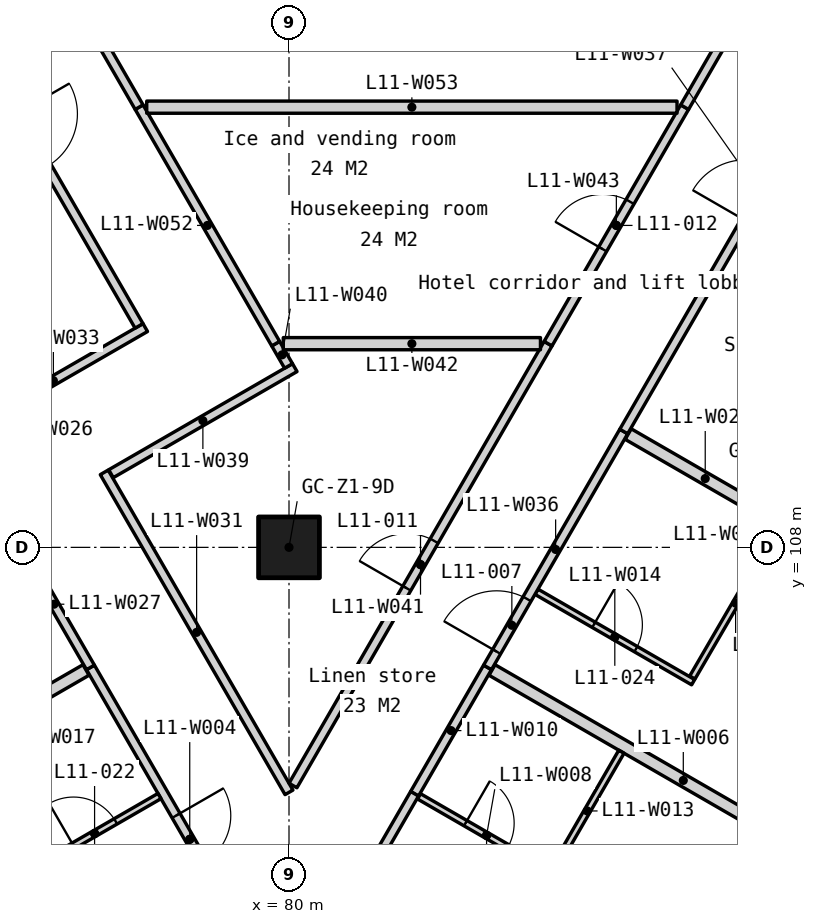
"""IFC4 building model, lengths in metres.
Left out: names, types, materials, properties, quantities, classifications, styles, units other than length and angle.
Written with IfcOpenShell. Run it as: python <this file> out.ifc"""

import sys

from ifc_helpers import new_model, si_unit, direction, frame, frame_2d, origin, origin_2d, place, context, subcontext, project, spatial, polyline, rectangle, outline, extrude, element, fill, save


model = new_model("IFC4")
c1 = context("Model", 3, precision=1e-05, world=origin(), true_north=direction((0.0, 1.0)))
c2 = subcontext(c1, "Body", "Model", "MODEL_VIEW")
j1 = project(units=[si_unit("LENGTHUNIT", "METRE"), si_unit("PLANEANGLEUNIT", "RADIAN")], contexts=[c1])
p1 = place(None, origin())
s1 = spatial("IfcSite", under=j1, at=p1, CompositionType="ELEMENT")
p2 = place(p1, origin())
s2 = spatial("IfcBuilding", under=s1, at=p2, CompositionType="ELEMENT")
p3 = place(p2, frame((0.0, 0.0, 52.5)))
s3 = spatial("IfcBuildingStorey", under=s2, at=p3, CompositionType="ELEMENT", Elevation=52.5)
p4 = place(p3, frame((80.0, 108.0, 0.0), z_axis=(0.0, 0.0, 1.0), x_axis=(1.0, 0.0, 0.0)))
e1 = element("IfcColumn", 1, at=p4, inside=s3, PredefinedType="COLUMN", context=c2, shape_type="SweptSolid", body=[
    extrude(rectangle(XDim=1.0, YDim=1.0, at=origin_2d()), origin(), (0.0, 0.0, 1.0), 3.5),
])
p5 = place(p3, frame((64.305, 112.405, -0.15), z_axis=(0.0, 0.0, 1.0), x_axis=(0.499997464327, -0.866026867751, 0.0)))
e2 = element("IfcWall", 2, at=p5, inside=s3, PredefinedType="SOLIDWALL", context=c2, shape_type="SweptSolid", body=[
    extrude(outline(polyline([(25.18, 3.5), (25.18, 0.0), (0.0, 0.0), (0.0, 3.5), (25.18, 3.5)])), frame((0.0, 0.225, 0.0), z_axis=(0.0, -1.0, 0.0), x_axis=(1.0, 0.0, 0.0)), (0.0, 0.0, 1.0), 0.45),
])
p6 = place(p5, frame((5.81, 0.0, 1.05)))
e3 = element("IfcOpeningElement", 3, at=p6, cuts=e2, PredefinedType="OPENING", context=c2, shape_type="SweptSolid", body=[
    extrude(rectangle(XDim=1.2, YDim=1.5, at=frame_2d((0.6, 0.75))), frame((0.0, 0.235, 0.0), z_axis=(0.0, -1.0, 0.0), x_axis=(1.0, 0.0, 0.0)), (0.0, 0.0, 1.0), 0.47),
])
p7 = place(p5, frame((7.51, 0.0, 1.05)))
e4 = element("IfcOpeningElement", 4, at=p7, cuts=e2, PredefinedType="OPENING", context=c2, shape_type="SweptSolid", body=[
    extrude(rectangle(XDim=1.2, YDim=1.5, at=frame_2d((0.6, 0.75))), frame((0.0, 0.235, 0.0), z_axis=(0.0, -1.0, 0.0), x_axis=(1.0, 0.0, 0.0)), (0.0, 0.0, 1.0), 0.47),
])
p8 = place(p5, frame((14.77, 0.0, 1.05)))
e5 = element("IfcOpeningElement", 5, at=p8, cuts=e2, PredefinedType="OPENING", context=c2, shape_type="SweptSolid", body=[
    extrude(rectangle(XDim=1.2, YDim=1.5, at=frame_2d((0.6, 0.75))), frame((0.0, 0.235, 0.0), z_axis=(0.0, -1.0, 0.0), x_axis=(1.0, 0.0, 0.0)), (0.0, 0.0, 1.0), 0.47),
])
p9 = place(p5, frame((16.47, 0.0, 1.05)))
e6 = element("IfcOpeningElement", 6, at=p9, cuts=e2, PredefinedType="OPENING", context=c2, shape_type="SweptSolid", body=[
    extrude(rectangle(XDim=1.2, YDim=1.5, at=frame_2d((0.6, 0.75))), frame((0.0, 0.235, 0.0), z_axis=(0.0, -1.0, 0.0), x_axis=(1.0, 0.0, 0.0)), (0.0, 0.0, 1.0), 0.47),
])
p10 = place(p5, frame((23.258, 0.0, 1.05)))
e7 = element("IfcOpeningElement", 7, at=p10, cuts=e2, PredefinedType="OPENING", context=c2, shape_type="SweptSolid", body=[
    extrude(rectangle(XDim=1.2, YDim=1.5, at=frame_2d((0.6, 0.75))), frame((0.0, 0.235, 0.0), z_axis=(0.0, -1.0, 0.0), x_axis=(1.0, 0.0, 0.0)), (0.0, 0.0, 1.0), 0.47),
])
p11 = place(p3, frame((83.105, 90.599, -0.15), z_axis=(0.0, 0.0, 1.0), x_axis=(0.499999201451, 0.866025864826, 0.0)))
e8 = element("IfcWall", 8, at=p11, inside=s3, PredefinedType="SOLIDWALL", context=c2, shape_type="SweptSolid", body=[
    extrude(outline(polyline([(44.8, 0.0), (44.8, 3.5), (0.0, 3.5), (0.0, 0.0), (44.8, 0.0)])), frame((0.0, 0.225, 0.0), z_axis=(0.0, -1.0, 0.0), x_axis=(1.0, 0.0, 0.0)), (0.0, 0.0, 1.0), 0.45),
])
p12 = place(p11, frame((0.722, 0.0, 1.05)))
e9 = element("IfcOpeningElement", 9, at=p12, cuts=e8, PredefinedType="OPENING", context=c2, shape_type="SweptSolid", body=[
    extrude(rectangle(XDim=1.2, YDim=1.5, at=frame_2d((0.6, 0.75))), frame((0.0, 0.235, 0.0), z_axis=(0.0, -1.0, 0.0), x_axis=(1.0, 0.0, 0.0)), (0.0, 0.0, 1.0), 0.47),
])
p13 = place(p11, frame((7.51, 0.0, 1.05)))
e10 = element("IfcOpeningElement", 10, at=p13, cuts=e8, PredefinedType="OPENING", context=c2, shape_type="SweptSolid", body=[
    extrude(rectangle(XDim=1.2, YDim=1.5, at=frame_2d((0.6, 0.75))), frame((0.0, 0.235, 0.0), z_axis=(0.0, -1.0, 0.0), x_axis=(1.0, 0.0, 0.0)), (0.0, 0.0, 1.0), 0.47),
])
p14 = place(p11, frame((9.21, 0.0, 1.05)))
e11 = element("IfcOpeningElement", 11, at=p14, cuts=e8, PredefinedType="OPENING", context=c2, shape_type="SweptSolid", body=[
    extrude(rectangle(XDim=1.2, YDim=1.5, at=frame_2d((0.6, 0.75))), frame((0.0, 0.235, 0.0), z_axis=(0.0, -1.0, 0.0), x_axis=(1.0, 0.0, 0.0)), (0.0, 0.0, 1.0), 0.47),
])
p15 = place(p11, frame((16.47, 0.0, 1.05)))
e12 = element("IfcOpeningElement", 12, at=p15, cuts=e8, PredefinedType="OPENING", context=c2, shape_type="SweptSolid", body=[
    extrude(rectangle(XDim=1.2, YDim=1.5, at=frame_2d((0.6, 0.75))), frame((0.0, 0.235, 0.0), z_axis=(0.0, -1.0, 0.0), x_axis=(1.0, 0.0, 0.0)), (0.0, 0.0, 1.0), 0.47),
])
p16 = place(p11, frame((18.17, 0.0, 1.05)))
e13 = element("IfcOpeningElement", 13, at=p16, cuts=e8, PredefinedType="OPENING", context=c2, shape_type="SweptSolid", body=[
    extrude(rectangle(XDim=1.2, YDim=1.5, at=frame_2d((0.6, 0.75))), frame((0.0, 0.235, 0.0), z_axis=(0.0, -1.0, 0.0), x_axis=(1.0, 0.0, 0.0)), (0.0, 0.0, 1.0), 0.47),
])
p17 = place(p11, frame((25.43, 0.0, 1.05)))
e14 = element("IfcOpeningElement", 14, at=p17, cuts=e8, PredefinedType="OPENING", context=c2, shape_type="SweptSolid", body=[
    extrude(rectangle(XDim=1.2, YDim=1.5, at=frame_2d((0.6, 0.75))), frame((0.0, 0.235, 0.0), z_axis=(0.0, -1.0, 0.0), x_axis=(1.0, 0.0, 0.0)), (0.0, 0.0, 1.0), 0.47),
])
p18 = place(p11, frame((27.13, 0.0, 1.05)))
e15 = element("IfcOpeningElement", 15, at=p18, cuts=e8, PredefinedType="OPENING", context=c2, shape_type="SweptSolid", body=[
    extrude(rectangle(XDim=1.2, YDim=1.5, at=frame_2d((0.6, 0.75))), frame((0.0, 0.235, 0.0), z_axis=(0.0, -1.0, 0.0), x_axis=(1.0, 0.0, 0.0)), (0.0, 0.0, 1.0), 0.47),
])
p19 = place(p11, frame((34.39, 0.0, 1.05)))
e16 = element("IfcOpeningElement", 16, at=p19, cuts=e8, PredefinedType="OPENING", context=c2, shape_type="SweptSolid", body=[
    extrude(rectangle(XDim=1.2, YDim=1.5, at=frame_2d((0.6, 0.75))), frame((0.0, 0.235, 0.0), z_axis=(0.0, -1.0, 0.0), x_axis=(1.0, 0.0, 0.0)), (0.0, 0.0, 1.0), 0.47),
])
p20 = place(p11, frame((36.09, 0.0, 1.05)))
e17 = element("IfcOpeningElement", 17, at=p20, cuts=e8, PredefinedType="OPENING", context=c2, shape_type="SweptSolid", body=[
    extrude(rectangle(XDim=1.2, YDim=1.5, at=frame_2d((0.6, 0.75))), frame((0.0, 0.235, 0.0), z_axis=(0.0, -1.0, 0.0), x_axis=(1.0, 0.0, 0.0)), (0.0, 0.0, 1.0), 0.47),
])
p21 = place(p11, frame((42.878, 0.0, 1.05)))
e18 = element("IfcOpeningElement", 18, at=p21, cuts=e8, PredefinedType="OPENING", context=c2, shape_type="SweptSolid", body=[
    extrude(rectangle(XDim=1.2, YDim=1.5, at=frame_2d((0.6, 0.75))), frame((0.0, 0.235, 0.0), z_axis=(0.0, -1.0, 0.0), x_axis=(1.0, 0.0, 0.0)), (0.0, 0.0, 1.0), 0.47),
])
p22 = place(p3, frame((76.735, 106.026, 0.0), z_axis=(0.0, 0.0, 1.0), x_axis=(0.499995393218, -0.866028063495, 0.0)))
e19 = element("IfcWall", 19, at=p22, inside=s3, PredefinedType="PARTITIONING", context=c2, shape_type="SweptSolid", body=[
    extrude(rectangle(XDim=6.53, YDim=0.15, at=frame_2d((3.265, 0.0))), origin(), (0.0, 0.0, 1.0), 3.35),
])
p23 = place(p22, frame((2.815, 0.0, 0.0)))
e20 = element("IfcOpeningElement", 20, at=p23, cuts=e19, PredefinedType="OPENING", context=c2, shape_type="SweptSolid", body=[
    extrude(rectangle(XDim=0.9, YDim=2.1, at=frame_2d((0.45, 1.05))), frame((0.0, 0.085, 0.0), z_axis=(0.0, -1.0, 0.0), x_axis=(1.0, 0.0, 0.0)), (0.0, 0.0, 1.0), 0.17),
])
p24 = place(p3, frame((83.339, 105.983, 0.0), z_axis=(0.0, 0.0, 1.0), x_axis=(0.866023858256, -0.500002676924, 0.0)))
e21 = element("IfcWall", 21, at=p24, inside=s3, PredefinedType="PARTITIONING", context=c2, shape_type="SweptSolid", body=[
    extrude(rectangle(XDim=7.265, YDim=0.2, at=frame_2d((3.633, 0.0))), origin(), (0.0, 0.0, 1.0), 3.35),
])
p25 = place(p3, frame((82.139, 103.905, 0.0), z_axis=(0.0, 0.0, 1.0), x_axis=(0.866014388206, -0.500019079056, 0.0)))
e22 = element("IfcWall", 22, at=p25, inside=s3, PredefinedType="PARTITIONING", context=c2, shape_type="SweptSolid", body=[
    extrude(rectangle(XDim=2.565, YDim=0.1, at=frame_2d((1.282, 0.0))), origin(), (0.0, 0.0, 1.0), 3.35),
])
p26 = place(p25, frame((0.883, 0.0, 0.0)))
e23 = element("IfcOpeningElement", 23, at=p26, cuts=e22, PredefinedType="OPENING", context=c2, shape_type="SweptSolid", body=[
    extrude(rectangle(XDim=0.8, YDim=2.1, at=frame_2d((0.4, 1.05))), frame((0.0, 0.06, 0.0), z_axis=(0.0, -1.0, 0.0), x_axis=(1.0, 0.0, 0.0)), (0.0, 0.0, 1.0), 0.12),
])
p27 = place(p3, frame((75.735, 102.677, 0.0), z_axis=(0.0, 0.0, 1.0), x_axis=(0.866040446274, 0.499973944738, 0.0)))
e24 = element("IfcWall", 24, at=p27, inside=s3, PredefinedType="PARTITIONING", context=c2, shape_type="SweptSolid", body=[
    extrude(rectangle(XDim=2.465, YDim=0.1, at=frame_2d((1.232, 0.0))), origin(), (0.0, 0.0, 1.0), 3.35),
])
p28 = place(p27, frame((0.833, 0.0, 0.0)))
e25 = element("IfcOpeningElement", 25, at=p28, cuts=e24, PredefinedType="OPENING", context=c2, shape_type="SweptSolid", body=[
    extrude(rectangle(XDim=0.8, YDim=2.1, at=frame_2d((0.4, 1.05))), frame((0.0, 0.06, 0.0), z_axis=(0.0, -1.0, 0.0), x_axis=(1.0, 0.0, 0.0)), (0.0, 0.0, 1.0), 0.12),
])
p29 = place(p3, frame((82.065, 103.947, 0.0), z_axis=(0.0, 0.0, 1.0), x_axis=(0.500001309137, 0.866024647952, 0.0)))
e26 = element("IfcWall", 26, at=p29, inside=s3, PredefinedType="PARTITIONING", context=c2, shape_type="SweptSolid", body=[
    extrude(rectangle(XDim=2.4, YDim=0.15, at=frame_2d((1.2, 0.0))), origin(), (0.0, 0.0, 1.0), 3.35),
])
p30 = place(p3, frame((80.06, 100.474, 0.0), z_axis=(0.0, 0.0, 1.0), x_axis=(0.499963124258, 0.866046692957, 0.0)))
e27 = element("IfcWall", 27, at=p30, inside=s3, PredefinedType="PARTITIONING", context=c2, shape_type="SweptSolid", body=[
    extrude(rectangle(XDim=4.01, YDim=0.15, at=frame_2d((2.005, 0.0))), origin(), (0.0, 0.0, 1.0), 3.35),
])
p31 = place(p30, frame((1.555, 0.0, 0.0)))
e28 = element("IfcOpeningElement", 28, at=p31, cuts=e27, PredefinedType="OPENING", context=c2, shape_type="SweptSolid", body=[
    extrude(rectangle(XDim=0.9, YDim=2.1, at=frame_2d((0.45, 1.05))), frame((0.0, 0.085, 0.0), z_axis=(0.0, -1.0, 0.0), x_axis=(1.0, 0.0, 0.0)), (0.0, 0.0, 1.0), 0.17),
])
p32 = place(p3, frame((84.342, 102.69, 0.0), z_axis=(0.0, 0.0, 1.0), x_axis=(0.499966648284, 0.866044658551, 0.0)))
e29 = element("IfcWall", 29, at=p32, inside=s3, PredefinedType="PARTITIONING", context=c2, shape_type="SweptSolid", body=[
    extrude(rectangle(XDim=2.25, YDim=0.1, at=frame_2d((1.125, 0.0))), origin(), (0.0, 0.0, 1.0), 3.35),
])
p33 = place(p3, frame((84.07, 107.27, 0.0), z_axis=(0.0, 0.0, 1.0), x_axis=(0.866053027861, -0.499952150643, 0.0)))
e30 = element("IfcWall", 30, at=p33, inside=s3, PredefinedType="PARTITIONING", context=c2, shape_type="SweptSolid", body=[
    extrude(rectangle(XDim=2.975, YDim=0.1, at=frame_2d((1.487, 0.0))), origin(), (0.0, 0.0, 1.0), 3.35),
])
p34 = place(p33, frame((1.087, 0.0, 0.0)))
e31 = element("IfcOpeningElement", 31, at=p34, cuts=e30, PredefinedType="OPENING", context=c2, shape_type="SweptSolid", body=[
    extrude(rectangle(XDim=0.8, YDim=2.1, at=frame_2d((0.4, 1.05))), frame((0.0, 0.06, 0.0), z_axis=(0.0, -1.0, 0.0), x_axis=(1.0, 0.0, 0.0)), (0.0, 0.0, 1.0), 0.12),
])
p35 = place(p3, frame((74.483, 104.726, 0.0), z_axis=(0.0, 0.0, 1.0), x_axis=(0.866006140796, 0.500033362991, 0.0)))
e32 = element("IfcWall", 32, at=p35, inside=s3, PredefinedType="PARTITIONING", context=c2, shape_type="SweptSolid", body=[
    extrude(rectangle(XDim=2.515, YDim=0.2, at=frame_2d((1.257, 0.0))), origin(), (0.0, 0.0, 1.0), 3.35),
])
p36 = place(p3, frame((75.535, 108.104, 0.0), z_axis=(0.0, 0.0, 1.0), x_axis=(0.500033551112, -0.866006032174, 0.0)))
e33 = element("IfcWall", 33, at=p36, inside=s3, PredefinedType="PARTITIONING", context=c2, shape_type="SweptSolid", body=[
    extrude(rectangle(XDim=2.4, YDim=0.15, at=frame_2d((1.2, 0.0))), origin(), (0.0, 0.0, 1.0), 3.35),
])
p37 = place(p3, frame((85.579, 109.863, 0.0), z_axis=(0.0, 0.0, 1.0), x_axis=(0.86601045545, -0.500025890382, 0.0)))
e34 = element("IfcWall", 34, at=p37, inside=s3, PredefinedType="PARTITIONING", context=c2, shape_type="SweptSolid", body=[
    extrude(rectangle(XDim=2.925, YDim=0.2, at=frame_2d((1.462, 0.0))), origin(), (0.0, 0.0, 1.0), 3.35),
])
p38 = place(p3, frame((86.633, 105.859, 0.0), z_axis=(0.0, 0.0, 1.0), x_axis=(0.502878343763, 0.864357201263, 0.0)))
e35 = element("IfcWall", 35, at=p38, inside=s3, PredefinedType="PARTITIONING", context=c2, shape_type="SweptSolid", body=[
    extrude(rectangle(XDim=2.83, YDim=0.1, at=frame_2d((1.415, 0.0))), origin(), (0.0, 0.0, 1.0), 3.35),
])
p39 = place(p3, frame((76.961, 109.234, 0.0), z_axis=(0.0, 0.0, 1.0), x_axis=(0.499984420002, -0.866034398714, 0.0)))
e36 = element("IfcWall", 36, at=p39, inside=s3, PredefinedType="PARTITIONING", context=c2, shape_type="SweptSolid", body=[
    extrude(rectangle(XDim=6.077, YDim=0.15, at=frame_2d((3.039, 0.0))), origin(), (0.0, 0.0, 1.0), 3.35),
])
p40 = place(p3, frame((74.614, 109.87, 0.0), z_axis=(0.0, 0.0, 1.0), x_axis=(0.866043466982, 0.49996871232, 0.0)))
e37 = element("IfcWall", 37, at=p40, inside=s3, PredefinedType="PARTITIONING", context=c2, shape_type="SweptSolid", body=[
    extrude(rectangle(XDim=3.49, YDim=0.15, at=frame_2d((1.745, 0.0))), origin(), (0.0, 0.0, 1.0), 3.35),
])
p41 = place(p3, frame((83.265, 106.026, 0.0), z_axis=(0.0, 0.0, 1.0), x_axis=(0.499989762656, 0.866031314237, 0.0)))
e38 = element("IfcWall", 38, at=p41, inside=s3, PredefinedType="PARTITIONING", context=c2, shape_type="SweptSolid", body=[
    extrude(rectangle(XDim=4.48, YDim=0.15, at=frame_2d((2.24, 0.0))), origin(), (0.0, 0.0, 1.0), 3.35),
])
p42 = place(p41, frame((0.3, 0.0, 0.0)))
e39 = element("IfcOpeningElement", 39, at=p42, cuts=e38, PredefinedType="OPENING", context=c2, shape_type="SweptSolid", body=[
    extrude(rectangle(XDim=1.0, YDim=2.1, at=frame_2d((0.5, 1.05))), frame((0.0, 0.085, 0.0), z_axis=(0.0, -1.0, 0.0), x_axis=(1.0, 0.0, 0.0)), (0.0, 0.0, 1.0), 0.17),
])
p43 = place(p3, frame((85.505, 109.906, 0.0), z_axis=(0.0, 0.0, 1.0), x_axis=(0.500017993482, 0.866015014994, 0.0)))
e40 = element("IfcWall", 40, at=p43, inside=s3, PredefinedType="PARTITIONING", context=c2, shape_type="SweptSolid", body=[
    extrude(rectangle(XDim=9.01, YDim=0.15, at=frame_2d((4.505, 0.0))), origin(), (0.0, 0.0, 1.0), 3.35),
])
p44 = place(p43, frame((4.005, 0.0, 0.0)))
e41 = element("IfcOpeningElement", 41, at=p44, cuts=e40, PredefinedType="OPENING", context=c2, shape_type="SweptSolid", body=[
    extrude(rectangle(XDim=1.0, YDim=2.1, at=frame_2d((0.5, 1.05))), frame((0.0, 0.085, 0.0), z_axis=(0.0, -1.0, 0.0), x_axis=(1.0, 0.0, 0.0)), (0.0, 0.0, 1.0), 0.17),
])
p45 = place(p3, frame((77.073, 109.211, 0.0), z_axis=(0.0, 0.0, 1.0), x_axis=(0.866013176292, 0.50002117804, 0.0)))
e42 = element("IfcWall", 42, at=p45, inside=s3, PredefinedType="PARTITIONING", context=c2, shape_type="SweptSolid", body=[
    extrude(rectangle(XDim=3.49, YDim=0.15, at=frame_2d((1.745, 0.0))), origin(), (0.0, 0.0, 1.0), 3.35),
])
p46 = place(p3, frame((79.781, 111.35, 0.0), z_axis=(0.0, 0.0, 1.0), x_axis=(0.499739105689, -0.866175978797, 0.0)))
e43 = element("IfcWall", 43, at=p46, inside=s3, PredefinedType="PARTITIONING", context=c2, shape_type="SweptSolid", body=[
    extrude(rectangle(XDim=0.423, YDim=0.15, at=frame_2d((0.211, 0.0))), origin(), (0.0, 0.0, 1.0), 3.35),
])
p47 = place(p3, frame((80.065, 104.083, 0.0), z_axis=(0.0, 0.0, 1.0), x_axis=(0.49999109456, 0.866030545282, 0.0)))
e44 = element("IfcWall", 44, at=p47, inside=s3, PredefinedType="PARTITIONING", context=c2, shape_type="SweptSolid", body=[
    extrude(rectangle(XDim=8.391, YDim=0.15, at=frame_2d((4.196, 0.0))), origin(), (0.0, 0.0, 1.0), 3.35),
])
p48 = place(p47, frame((3.746, 0.0, 0.0)))
e45 = element("IfcOpeningElement", 45, at=p48, cuts=e44, PredefinedType="OPENING", context=c2, shape_type="SweptSolid", body=[
    extrude(rectangle(XDim=0.9, YDim=2.1, at=frame_2d((0.45, 1.05))), frame((0.0, 0.085, 0.0), z_axis=(0.0, -1.0, 0.0), x_axis=(1.0, 0.0, 0.0)), (0.0, 0.0, 1.0), 0.17),
])
p49 = place(p3, frame((79.906, 111.35, 0.0), z_axis=(0.0, 0.0, 1.0), x_axis=(1.0, 0.0, 0.0)))
e46 = element("IfcWall", 46, at=p49, inside=s3, PredefinedType="PARTITIONING", context=c2, shape_type="SweptSolid", body=[
    extrude(rectangle(XDim=4.229, YDim=0.2, at=frame_2d((2.115, 0.0))), origin(), (0.0, 0.0, 1.0), 3.35),
])
p50 = place(p3, frame((84.26, 111.35, 0.0), z_axis=(0.0, 0.0, 1.0), x_axis=(0.500003186274, 0.866023564181, 0.0)))
e47 = element("IfcWall", 47, at=p50, inside=s3, PredefinedType="PARTITIONING", context=c2, shape_type="SweptSolid", body=[
    extrude(rectangle(XDim=4.492, YDim=0.15, at=frame_2d((2.246, 0.0))), origin(), (0.0, 0.0, 1.0), 3.35),
])
p51 = place(p50, frame((1.796, 0.0, 0.0)))
e48 = element("IfcOpeningElement", 48, at=p51, cuts=e47, PredefinedType="OPENING", context=c2, shape_type="SweptSolid", body=[
    extrude(rectangle(XDim=0.9, YDim=2.1, at=frame_2d((0.45, 1.05))), frame((0.0, 0.085, 0.0), z_axis=(0.0, -1.0, 0.0), x_axis=(1.0, 0.0, 0.0)), (0.0, 0.0, 1.0), 0.17),
])
p52 = place(p3, frame((74.007, 117.75, 0.0), z_axis=(0.0, 0.0, 1.0), x_axis=(0.500026110575, -0.866010328312, 0.0)))
e49 = element("IfcWall", 49, at=p52, inside=s3, PredefinedType="PARTITIONING", context=c2, shape_type="SweptSolid", body=[
    extrude(rectangle(XDim=7.052, YDim=0.15, at=frame_2d((3.526, 0.0))), origin(), (0.0, 0.0, 1.0), 3.35),
])
p53 = place(p52, frame((3.026, 0.0, 0.0)))
e50 = element("IfcOpeningElement", 50, at=p53, cuts=e49, PredefinedType="OPENING", context=c2, shape_type="SweptSolid", body=[
    extrude(rectangle(XDim=1.0, YDim=2.1, at=frame_2d((0.5, 1.05))), frame((0.0, 0.085, 0.0), z_axis=(0.0, -1.0, 0.0), x_axis=(1.0, 0.0, 0.0)), (0.0, 0.0, 1.0), 0.17),
])
p54 = place(p3, frame((77.535, 115.24, 0.0), z_axis=(0.0, 0.0, 1.0), x_axis=(0.500043949999, -0.866000027754, 0.0)))
e51 = element("IfcWall", 51, at=p54, inside=s3, PredefinedType="PARTITIONING", context=c2, shape_type="SweptSolid", body=[
    extrude(rectangle(XDim=4.492, YDim=0.15, at=frame_2d((2.246, 0.0))), origin(), (0.0, 0.0, 1.0), 3.35),
])
p55 = place(p3, frame((77.66, 115.24, 0.0), z_axis=(0.0, 0.0, 1.0), x_axis=(1.0, 0.0, 0.0)))
e52 = element("IfcWall", 52, at=p55, inside=s3, PredefinedType="PARTITIONING", context=c2, shape_type="SweptSolid", body=[
    extrude(rectangle(XDim=8.721, YDim=0.2, at=frame_2d((4.361, 0.0))), origin(), (0.0, 0.0, 1.0), 3.35),
])
p56 = place(p3, frame((86.506, 115.24, 0.0), z_axis=(0.0, 0.0, 1.0), x_axis=(0.500016544581, 0.866015851556, 0.0)))
e53 = element("IfcWall", 53, at=p56, inside=s3, PredefinedType="PARTITIONING", context=c2, shape_type="SweptSolid", body=[
    extrude(rectangle(XDim=2.898, YDim=0.15, at=frame_2d((1.449, 0.0))), origin(), (0.0, 0.0, 1.0), 3.35),
])
p57 = place(p3, frame((76.086, 117.75, 0.0), z_axis=(0.0, 0.0, 1.0), x_axis=(0.499953366038, -0.866052326241, 0.0)))
e54 = element("IfcWall", 54, at=p57, inside=s3, PredefinedType="PARTITIONING", context=c2, shape_type="SweptSolid", body=[
    extrude(rectangle(XDim=2.898, YDim=0.15, at=frame_2d((1.449, 0.0))), origin(), (0.0, 0.0, 1.0), 3.35),
])
p58 = place(p23, origin())
e55 = element("IfcDoor", 55, at=p58, inside=s3, OperationType="SINGLE_SWING_LEFT", PredefinedType="DOOR", context=c2, shape_type="SweptSolid", body=[
    extrude(rectangle(XDim=0.9, YDim=2.1, at=frame_2d((0.45, 1.05))), frame((0.0, 0.025, 0.0), z_axis=(0.0, -1.0, 0.0), x_axis=(1.0, 0.0, 0.0)), (0.0, 0.0, 1.0), 0.05),
])
fill(e20, e55)
p59 = place(p42, origin())
e56 = element("IfcDoor", 56, at=p59, inside=s3, OperationType="SINGLE_SWING_LEFT", PredefinedType="DOOR", context=c2, shape_type="SweptSolid", body=[
    extrude(rectangle(XDim=1.0, YDim=2.1, at=frame_2d((0.5, 1.05))), frame((0.0, 0.025, 0.0), z_axis=(0.0, -1.0, 0.0), x_axis=(1.0, 0.0, 0.0)), (0.0, 0.0, 1.0), 0.05),
])
fill(e39, e56)
p60 = place(p48, origin())
e57 = element("IfcDoor", 57, at=p60, inside=s3, OperationType="SINGLE_SWING_LEFT", PredefinedType="DOOR", context=c2, shape_type="SweptSolid", body=[
    extrude(rectangle(XDim=0.9, YDim=2.1, at=frame_2d((0.45, 1.05))), frame((0.0, 0.025, 0.0), z_axis=(0.0, -1.0, 0.0), x_axis=(1.0, 0.0, 0.0)), (0.0, 0.0, 1.0), 0.05),
])
fill(e45, e57)
p61 = place(p51, origin())
e58 = element("IfcDoor", 58, at=p61, inside=s3, OperationType="SINGLE_SWING_LEFT", PredefinedType="DOOR", context=c2, shape_type="SweptSolid", body=[
    extrude(rectangle(XDim=0.9, YDim=2.1, at=frame_2d((0.45, 1.05))), frame((0.0, 0.025, 0.0), z_axis=(0.0, -1.0, 0.0), x_axis=(1.0, 0.0, 0.0)), (0.0, 0.0, 1.0), 0.05),
])
fill(e48, e58)
p62 = place(p28, origin())
e59 = element("IfcDoor", 59, at=p62, inside=s3, OperationType="SINGLE_SWING_LEFT", PredefinedType="DOOR", context=c2, shape_type="SweptSolid", body=[
    extrude(rectangle(XDim=0.8, YDim=2.1, at=frame_2d((0.4, 1.05))), frame((0.0, 0.025, 0.0), z_axis=(0.0, -1.0, 0.0), x_axis=(1.0, 0.0, 0.0)), (0.0, 0.0, 1.0), 0.05),
])
fill(e25, e59)
p63 = place(p26, origin())
e60 = element("IfcDoor", 60, at=p63, inside=s3, OperationType="SINGLE_SWING_LEFT", PredefinedType="DOOR", context=c2, shape_type="SweptSolid", body=[
    extrude(rectangle(XDim=0.8, YDim=2.1, at=frame_2d((0.4, 1.05))), frame((0.0, 0.025, 0.0), z_axis=(0.0, -1.0, 0.0), x_axis=(1.0, 0.0, 0.0)), (0.0, 0.0, 1.0), 0.05),
])
fill(e23, e60)
p64 = place(p34, origin())
e61 = element("IfcDoor", 61, at=p64, inside=s3, OperationType="SINGLE_SWING_LEFT", PredefinedType="DOOR", context=c2, shape_type="SweptSolid", body=[
    extrude(rectangle(XDim=0.8, YDim=2.1, at=frame_2d((0.4, 1.05))), frame((0.0, 0.025, 0.0), z_axis=(0.0, -1.0, 0.0), x_axis=(1.0, 0.0, 0.0)), (0.0, 0.0, 1.0), 0.05),
])
fill(e31, e61)
save(model, sys.argv[1])
